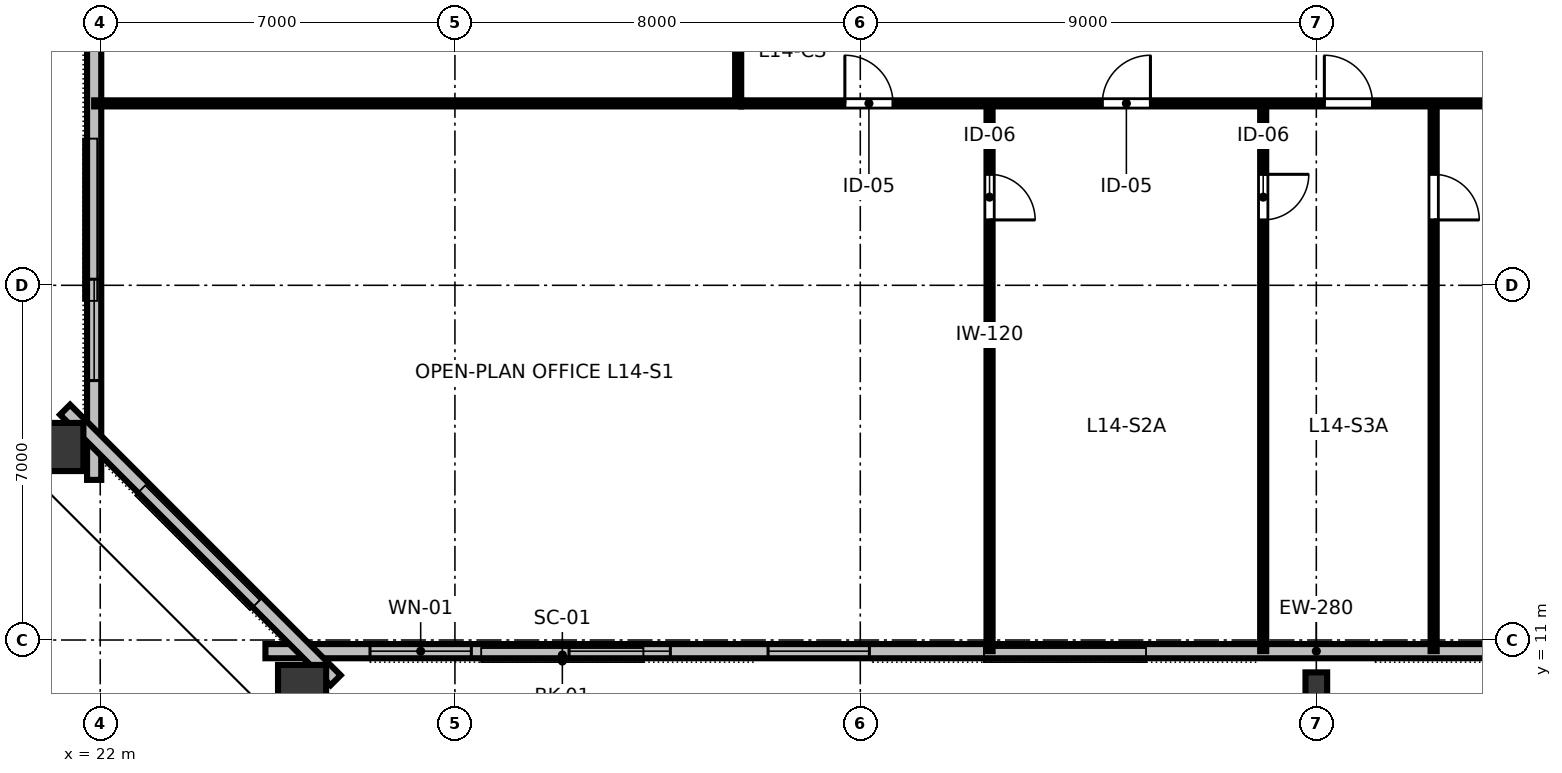
"""IFC4 building model, lengths in metres.
Left out: names, types, materials, properties, quantities, classifications, styles, units other than length and angle.
Written with IfcOpenShell. Run it as: python <this file> out.ifc"""

import sys

from ifc_helpers import new_model, si_unit, direction, frame, frame_2d, origin, origin_2d, place, context, subcontext, project, spatial, rectangle, hollow_rectangle, i_section, extrude, element, fill, save


model = new_model("IFC4")
c1 = context("Model", 3, precision=1e-05, world=origin(), true_north=direction((0.0, 1.0)))
c2 = subcontext(c1, "Body", "Model", "MODEL_VIEW")
j1 = project(units=[si_unit("LENGTHUNIT", "METRE"), si_unit("PLANEANGLEUNIT", "RADIAN")], contexts=[c1])
p1 = place(None, origin())
s1 = spatial("IfcSite", under=j1, at=p1, CompositionType="ELEMENT")
p2 = place(p1, origin())
s2 = spatial("IfcBuilding", under=s1, at=p2, CompositionType="ELEMENT")
p3 = place(p2, frame((0.0, 0.0, 56.8)))
s3 = spatial("IfcBuildingStorey", under=s2, at=p3, CompositionType="ELEMENT", Elevation=56.8)
p4 = place(p3, frame((25.984, 9.933, 0.0), z_axis=(-0.04485544424, -0.088480981137, 0.995067387215), x_axis=(0.891933822614, -0.452165960769, 0.0)))
e1 = element("IfcColumn", 1, at=p4, inside=s3, PredefinedType="COLUMN", context=c2, shape_type="SweptSolid", body=[
    extrude(hollow_rectangle(XDim=0.95, YDim=1.15, WallThickness=0.06, at=origin_2d()), origin(), (0.0, 0.0, 1.0), 3.375),
])
p5 = place(p3, frame((46.0, 10.12, 0.0), z_axis=(0.0, -0.089001216718, 0.996031517284), x_axis=(1.0, 0.0, 0.0)))
e2 = element("IfcColumn", 2, at=p5, inside=s3, PredefinedType="COLUMN", context=c2, shape_type="SweptSolid", body=[
    extrude(i_section(OverallWidth=0.428, OverallDepth=0.483, WebThickness=0.051, FlangeThickness=0.082, FilletRadius=0.025, at=origin_2d()), origin(), (0.0, 0.0, 1.0), 3.371),
])
p6 = place(p3, frame((21.093, 14.809, 0.0), z_axis=(-0.103150348316, -0.030287313206, 0.994204548522), x_axis=(0.953933183148, 0.280096708997, 0.107504956625)))
e3 = element("IfcColumn", 3, at=p6, inside=s3, PredefinedType="COLUMN", context=c2, shape_type="SweptSolid", body=[
    extrude(hollow_rectangle(XDim=0.95, YDim=1.15, WallThickness=0.06, at=origin_2d()), origin(), (0.0, 0.0, 1.0), 3.377),
])
p7 = place(p3, frame((25.26, 10.78, 0.0), z_axis=(0.0, 0.0, 1.0), x_axis=(1.0, 0.0, 0.0)))
e4 = element("IfcWall", 4, at=p7, inside=s3, PredefinedType="STANDARD", context=c2, shape_type="SweptSolid", body=[
    extrude(rectangle(XDim=41.48, YDim=0.28, at=frame_2d((20.74, 0.0))), origin(), (0.0, 0.0, 1.0), 3.36),
])
p8 = place(p7, frame((2.064, 0.0, 0.8)))
e5 = element("IfcOpeningElement", 5, at=p8, cuts=e4, PredefinedType="OPENING", context=c2, shape_type="SweptSolid", body=[
    extrude(rectangle(XDim=2.0, YDim=1.95, at=frame_2d((1.0, 0.975))), frame((0.0, 0.15, 0.0), z_axis=(0.0, -1.0, 0.0), x_axis=(1.0, 0.0, 0.0)), (0.0, 0.0, 1.0), 0.3),
])
p9 = place(p7, frame((5.992, 0.0, 0.8)))
e6 = element("IfcOpeningElement", 6, at=p9, cuts=e4, PredefinedType="OPENING", context=c2, shape_type="SweptSolid", body=[
    extrude(rectangle(XDim=2.0, YDim=1.95, at=frame_2d((1.0, 0.975))), frame((0.0, 0.15, 0.0), z_axis=(0.0, -1.0, 0.0), x_axis=(1.0, 0.0, 0.0)), (0.0, 0.0, 1.0), 0.3),
])
p10 = place(p7, frame((9.92, 0.0, 0.8)))
e7 = element("IfcOpeningElement", 7, at=p10, cuts=e4, PredefinedType="OPENING", context=c2, shape_type="SweptSolid", body=[
    extrude(rectangle(XDim=2.0, YDim=1.95, at=frame_2d((1.0, 0.975))), frame((0.0, 0.15, 0.0), z_axis=(0.0, -1.0, 0.0), x_axis=(1.0, 0.0, 0.0)), (0.0, 0.0, 1.0), 0.3),
])
p11 = place(p7, frame((25.632, 0.0, 0.8)))
e8 = element("IfcOpeningElement", 8, at=p11, cuts=e4, PredefinedType="OPENING", context=c2, shape_type="SweptSolid", body=[
    extrude(rectangle(XDim=2.0, YDim=1.95, at=frame_2d((1.0, 0.975))), frame((0.0, 0.15, 0.0), z_axis=(0.0, -1.0, 0.0), x_axis=(1.0, 0.0, 0.0)), (0.0, 0.0, 1.0), 0.3),
])
p12 = place(p7, frame((29.56, 0.0, 0.8)))
e9 = element("IfcOpeningElement", 9, at=p12, cuts=e4, PredefinedType="OPENING", context=c2, shape_type="SweptSolid", body=[
    extrude(rectangle(XDim=2.0, YDim=1.95, at=frame_2d((1.0, 0.975))), frame((0.0, 0.15, 0.0), z_axis=(0.0, -1.0, 0.0), x_axis=(1.0, 0.0, 0.0)), (0.0, 0.0, 1.0), 0.3),
])
p13 = place(p7, frame((33.488, 0.0, 0.8)))
e10 = element("IfcOpeningElement", 10, at=p13, cuts=e4, PredefinedType="OPENING", context=c2, shape_type="SweptSolid", body=[
    extrude(rectangle(XDim=2.0, YDim=1.95, at=frame_2d((1.0, 0.975))), frame((0.0, 0.15, 0.0), z_axis=(0.0, -1.0, 0.0), x_axis=(1.0, 0.0, 0.0)), (0.0, 0.0, 1.0), 0.3),
])
p14 = place(p7, frame((37.416, 0.0, 0.8)))
e11 = element("IfcOpeningElement", 11, at=p14, cuts=e4, PredefinedType="OPENING", context=c2, shape_type="SweptSolid", body=[
    extrude(rectangle(XDim=2.0, YDim=1.95, at=frame_2d((1.0, 0.975))), frame((0.0, 0.15, 0.0), z_axis=(0.0, -1.0, 0.0), x_axis=(1.0, 0.0, 0.0)), (0.0, 0.0, 1.0), 0.3),
])
p15 = place(p3, frame((21.88, 49.84, 0.0), z_axis=(0.0, 0.0, 1.0), x_axis=(0.0, -1.0, 0.0)))
e12 = element("IfcWall", 12, at=p15, inside=s3, PredefinedType="STANDARD", context=c2, shape_type="SweptSolid", body=[
    extrude(rectangle(XDim=35.68, YDim=0.28, at=frame_2d((17.84, 0.0))), origin(), (0.0, 0.0, 1.0), 3.36),
])
p16 = place(p15, frame((1.96, 0.0, 0.8)))
e13 = element("IfcOpeningElement", 13, at=p16, cuts=e12, PredefinedType="OPENING", context=c2, shape_type="SweptSolid", body=[
    extrude(rectangle(XDim=2.0, YDim=1.95, at=frame_2d((1.0, 0.975))), frame((0.0, 0.15, 0.0), z_axis=(0.0, -1.0, 0.0), x_axis=(1.0, 0.0, 0.0)), (0.0, 0.0, 1.0), 0.3),
])
p17 = place(p15, frame((9.4, 0.0, 0.8)))
e14 = element("IfcOpeningElement", 14, at=p17, cuts=e12, PredefinedType="OPENING", context=c2, shape_type="SweptSolid", body=[
    extrude(rectangle(XDim=2.0, YDim=1.95, at=frame_2d((1.0, 0.975))), frame((0.0, 0.15, 0.0), z_axis=(0.0, -1.0, 0.0), x_axis=(1.0, 0.0, 0.0)), (0.0, 0.0, 1.0), 0.3),
])
p18 = place(p15, frame((13.12, 0.0, 0.8)))
e15 = element("IfcOpeningElement", 15, at=p18, cuts=e12, PredefinedType="OPENING", context=c2, shape_type="SweptSolid", body=[
    extrude(rectangle(XDim=2.0, YDim=1.95, at=frame_2d((1.0, 0.975))), frame((0.0, 0.15, 0.0), z_axis=(0.0, -1.0, 0.0), x_axis=(1.0, 0.0, 0.0)), (0.0, 0.0, 1.0), 0.3),
])
p19 = place(p15, frame((20.56, 0.0, 0.8)))
e16 = element("IfcOpeningElement", 16, at=p19, cuts=e12, PredefinedType="OPENING", context=c2, shape_type="SweptSolid", body=[
    extrude(rectangle(XDim=2.0, YDim=1.95, at=frame_2d((1.0, 0.975))), frame((0.0, 0.15, 0.0), z_axis=(0.0, -1.0, 0.0), x_axis=(1.0, 0.0, 0.0)), (0.0, 0.0, 1.0), 0.3),
])
p20 = place(p15, frame((24.28, 0.0, 0.8)))
e17 = element("IfcOpeningElement", 17, at=p20, cuts=e12, PredefinedType="OPENING", context=c2, shape_type="SweptSolid", body=[
    extrude(rectangle(XDim=2.0, YDim=1.95, at=frame_2d((1.0, 0.975))), frame((0.0, 0.15, 0.0), z_axis=(0.0, -1.0, 0.0), x_axis=(1.0, 0.0, 0.0)), (0.0, 0.0, 1.0), 0.3),
])
p21 = place(p15, frame((31.72, 0.0, 0.8)))
e18 = element("IfcOpeningElement", 18, at=p21, cuts=e12, PredefinedType="OPENING", context=c2, shape_type="SweptSolid", body=[
    extrude(rectangle(XDim=2.0, YDim=1.95, at=frame_2d((1.0, 0.975))), frame((0.0, 0.15, 0.0), z_axis=(0.0, -1.0, 0.0), x_axis=(1.0, 0.0, 0.0)), (0.0, 0.0, 1.0), 0.3),
])
p22 = place(p3, frame((21.306, 15.545, 0.0), z_axis=(0.0, 0.0, 1.0), x_axis=(0.707106781187, -0.707106781187, 0.0)))
e19 = element("IfcWall", 19, at=p22, inside=s3, PredefinedType="STANDARD", context=c2, shape_type="SweptSolid", body=[
    extrude(rectangle(XDim=7.551, YDim=0.28, at=frame_2d((3.775, 0.0))), origin(), (0.0, 0.0, 1.0), 3.36),
])
p23 = place(p3, frame((39.551, 21.59, 0.0), z_axis=(0.0, 0.0, 1.0), x_axis=(0.0, -1.0, 0.0)))
e20 = element("IfcWall", 20, at=p23, inside=s3, PredefinedType="PARTITIONING", context=c2, shape_type="SweptSolid", body=[
    extrude(rectangle(XDim=10.81, YDim=0.12, at=frame_2d((5.405, 0.0))), origin(), (0.0, 0.0, 1.0), 2.64),
])
p24 = place(p23, frame((1.4, 0.0, 0.0)))
e21 = element("IfcOpeningElement", 21, at=p24, cuts=e20, PredefinedType="OPENING", context=c2, shape_type="SweptSolid", body=[
    extrude(rectangle(XDim=0.9, YDim=2.15, at=frame_2d((0.45, 1.075))), frame((0.0, 0.07, 0.0), z_axis=(0.0, -1.0, 0.0), x_axis=(1.0, 0.0, 0.0)), (0.0, 0.0, 1.0), 0.14),
])
p25 = place(p3, frame((44.952, 21.59, 0.0), z_axis=(0.0, 0.0, 1.0), x_axis=(0.0, -1.0, 0.0)))
e22 = element("IfcWall", 22, at=p25, inside=s3, PredefinedType="PARTITIONING", context=c2, shape_type="SweptSolid", body=[
    extrude(rectangle(XDim=10.81, YDim=0.12, at=frame_2d((5.405, 0.0))), origin(), (0.0, 0.0, 1.0), 2.64),
])
p26 = place(p25, frame((1.4, 0.0, 0.0)))
e23 = element("IfcOpeningElement", 23, at=p26, cuts=e22, PredefinedType="OPENING", context=c2, shape_type="SweptSolid", body=[
    extrude(rectangle(XDim=0.9, YDim=2.15, at=frame_2d((0.45, 1.075))), frame((0.0, 0.07, 0.0), z_axis=(0.0, -1.0, 0.0), x_axis=(1.0, 0.0, 0.0)), (0.0, 0.0, 1.0), 0.14),
])
p27 = place(p3, frame((48.316, 21.59, 0.0), z_axis=(0.0, 0.0, 1.0), x_axis=(0.0, -1.0, 0.0)))
e24 = element("IfcWall", 24, at=p27, inside=s3, PredefinedType="PARTITIONING", context=c2, shape_type="SweptSolid", body=[
    extrude(rectangle(XDim=10.81, YDim=0.12, at=frame_2d((5.405, 0.0))), origin(), (0.0, 0.0, 1.0), 2.64),
])
p28 = place(p27, frame((1.4, 0.0, 0.0)))
e25 = element("IfcOpeningElement", 25, at=p28, cuts=e24, PredefinedType="OPENING", context=c2, shape_type="SweptSolid", body=[
    extrude(rectangle(XDim=0.9, YDim=2.15, at=frame_2d((0.45, 1.075))), frame((0.0, 0.07, 0.0), z_axis=(0.0, -1.0, 0.0), x_axis=(1.0, 0.0, 0.0)), (0.0, 0.0, 1.0), 0.14),
])
p29 = place(p3, frame((34.65, 21.59, 0.0), z_axis=(0.0, 0.0, 1.0), x_axis=(1.0, 0.0, 0.0)))
e26 = element("IfcWall", 26, at=p29, inside=s3, PredefinedType="PARTITIONING", context=c2, shape_type="SweptSolid", body=[
    extrude(rectangle(XDim=22.7, YDim=0.12, at=frame_2d((11.35, 0.0))), origin(), (0.0, 0.0, 1.0), 2.64),
])
p30 = place(p29, frame((2.045, 0.0, 0.0)))
e27 = element("IfcOpeningElement", 27, at=p30, cuts=e26, PredefinedType="OPENING", context=c2, shape_type="SweptSolid", body=[
    extrude(rectangle(XDim=0.95, YDim=2.15, at=frame_2d((0.475, 1.075))), frame((0.0, 0.07, 0.0), z_axis=(0.0, -1.0, 0.0), x_axis=(1.0, 0.0, 0.0)), (0.0, 0.0, 1.0), 0.14),
])
p31 = place(p29, frame((7.126, 0.0, 0.0)))
e28 = element("IfcOpeningElement", 28, at=p31, cuts=e26, PredefinedType="OPENING", context=c2, shape_type="SweptSolid", body=[
    extrude(rectangle(XDim=0.95, YDim=2.15, at=frame_2d((0.475, 1.075))), frame((0.0, 0.07, 0.0), z_axis=(0.0, -1.0, 0.0), x_axis=(1.0, 0.0, 0.0)), (0.0, 0.0, 1.0), 0.14),
])
p32 = place(p29, frame((11.509, 0.0, 0.0)))
e29 = element("IfcOpeningElement", 29, at=p32, cuts=e26, PredefinedType="OPENING", context=c2, shape_type="SweptSolid", body=[
    extrude(rectangle(XDim=0.95, YDim=2.15, at=frame_2d((0.475, 1.075))), frame((0.0, 0.07, 0.0), z_axis=(0.0, -1.0, 0.0), x_axis=(1.0, 0.0, 0.0)), (0.0, 0.0, 1.0), 0.14),
])
p33 = place(p29, frame((17.638, 0.0, 0.0)))
e30 = element("IfcOpeningElement", 30, at=p33, cuts=e26, PredefinedType="OPENING", context=c2, shape_type="SweptSolid", body=[
    extrude(rectangle(XDim=0.95, YDim=2.15, at=frame_2d((0.475, 1.075))), frame((0.0, 0.07, 0.0), z_axis=(0.0, -1.0, 0.0), x_axis=(1.0, 0.0, 0.0)), (0.0, 0.0, 1.0), 0.14),
])
p34 = place(p3, frame((34.59, 21.65, 0.0), z_axis=(0.0, 0.0, 1.0), x_axis=(0.0, 1.0, 0.0)))
e31 = element("IfcWall", 31, at=p34, inside=s3, PredefinedType="PARTITIONING", context=c2, shape_type="SweptSolid", body=[
    extrude(rectangle(XDim=20.7, YDim=0.12, at=frame_2d((10.35, 0.0))), origin(), (0.0, 0.0, 1.0), 2.64),
])
p35 = place(p34, frame((9.875, 0.0, 0.0)))
e32 = element("IfcOpeningElement", 32, at=p35, cuts=e31, PredefinedType="OPENING", context=c2, shape_type="SweptSolid", body=[
    extrude(rectangle(XDim=0.95, YDim=2.15, at=frame_2d((0.475, 1.075))), frame((0.0, 0.07, 0.0), z_axis=(0.0, -1.0, 0.0), x_axis=(1.0, 0.0, 0.0)), (0.0, 0.0, 1.0), 0.14),
])
p36 = place(p3, frame((34.65, 21.59, 0.0), z_axis=(0.0, 0.0, 1.0), x_axis=(-1.0, 0.0, 0.0)))
e33 = element("IfcWall", 33, at=p36, inside=s3, PredefinedType="PARTITIONING", context=c2, shape_type="SweptSolid", body=[
    extrude(rectangle(XDim=12.77, YDim=0.12, at=frame_2d((6.385, 0.0))), origin(), (0.0, 0.0, 1.0), 2.64),
])
p37 = place(p8, origin())
e34 = element("IfcWindow", 34, at=p37, inside=s3, PartitioningType="SINGLE_PANEL", PredefinedType="WINDOW", context=c2, shape_type="SweptSolid", body=[
    extrude(rectangle(XDim=2.0, YDim=1.95, at=frame_2d((1.0, 0.975))), frame((0.0, 0.03, 0.0), z_axis=(0.0, -1.0, 0.0), x_axis=(1.0, 0.0, 0.0)), (0.0, 0.0, 1.0), 0.06),
])
fill(e5, e34)
p38 = place(p9, origin())
e35 = element("IfcWindow", 35, at=p38, inside=s3, PartitioningType="SINGLE_PANEL", PredefinedType="WINDOW", context=c2, shape_type="SweptSolid", body=[
    extrude(rectangle(XDim=2.0, YDim=1.95, at=frame_2d((1.0, 0.975))), frame((0.0, 0.03, 0.0), z_axis=(0.0, -1.0, 0.0), x_axis=(1.0, 0.0, 0.0)), (0.0, 0.0, 1.0), 0.06),
])
fill(e6, e35)
p39 = place(p10, origin())
e36 = element("IfcWindow", 36, at=p39, inside=s3, PartitioningType="SINGLE_PANEL", PredefinedType="WINDOW", context=c2, shape_type="SweptSolid", body=[
    extrude(rectangle(XDim=2.0, YDim=1.95, at=frame_2d((1.0, 0.975))), frame((0.0, 0.03, 0.0), z_axis=(0.0, -1.0, 0.0), x_axis=(1.0, 0.0, 0.0)), (0.0, 0.0, 1.0), 0.06),
])
fill(e7, e36)
p40 = place(p21, origin())
e37 = element("IfcWindow", 37, at=p40, inside=s3, PartitioningType="SINGLE_PANEL", PredefinedType="WINDOW", context=c2, shape_type="SweptSolid", body=[
    extrude(rectangle(XDim=2.0, YDim=1.95, at=frame_2d((1.0, 0.975))), frame((0.0, 0.03, 0.0), z_axis=(0.0, -1.0, 0.0), x_axis=(1.0, 0.0, 0.0)), (0.0, 0.0, 1.0), 0.06),
])
fill(e18, e37)
p41 = place(p24, origin())
e38 = element("IfcDoor", 38, at=p41, inside=s3, OperationType="SINGLE_SWING_RIGHT", PredefinedType="DOOR", context=c2, shape_type="SweptSolid", body=[
    extrude(rectangle(XDim=0.9, YDim=2.15, at=frame_2d((0.45, 1.075))), frame((0.0, 0.025, 0.0), z_axis=(0.0, -1.0, 0.0), x_axis=(1.0, 0.0, 0.0)), (0.0, 0.0, 1.0), 0.05),
])
fill(e21, e38)
p42 = place(p26, origin())
e39 = element("IfcDoor", 39, at=p42, inside=s3, OperationType="SINGLE_SWING_LEFT", PredefinedType="DOOR", context=c2, shape_type="SweptSolid", body=[
    extrude(rectangle(XDim=0.9, YDim=2.15, at=frame_2d((0.45, 1.075))), frame((0.0, 0.025, 0.0), z_axis=(0.0, -1.0, 0.0), x_axis=(1.0, 0.0, 0.0)), (0.0, 0.0, 1.0), 0.05),
])
fill(e23, e39)
p43 = place(p28, origin())
e40 = element("IfcDoor", 40, at=p43, inside=s3, OperationType="SINGLE_SWING_RIGHT", PredefinedType="DOOR", context=c2, shape_type="SweptSolid", body=[
    extrude(rectangle(XDim=0.9, YDim=2.15, at=frame_2d((0.45, 1.075))), frame((0.0, 0.025, 0.0), z_axis=(0.0, -1.0, 0.0), x_axis=(1.0, 0.0, 0.0)), (0.0, 0.0, 1.0), 0.05),
])
fill(e25, e40)
p44 = place(p30, origin())
e41 = element("IfcDoor", 41, at=p44, inside=s3, OperationType="SINGLE_SWING_LEFT", PredefinedType="DOOR", context=c2, shape_type="SweptSolid", body=[
    extrude(rectangle(XDim=0.95, YDim=2.15, at=frame_2d((0.475, 1.075))), frame((0.0, 0.025, 0.0), z_axis=(0.0, -1.0, 0.0), x_axis=(1.0, 0.0, 0.0)), (0.0, 0.0, 1.0), 0.05),
])
fill(e27, e41)
p45 = place(p31, origin())
e42 = element("IfcDoor", 42, at=p45, inside=s3, OperationType="SINGLE_SWING_RIGHT", PredefinedType="DOOR", context=c2, shape_type="SweptSolid", body=[
    extrude(rectangle(XDim=0.95, YDim=2.15, at=frame_2d((0.475, 1.075))), frame((0.0, 0.025, 0.0), z_axis=(0.0, -1.0, 0.0), x_axis=(1.0, 0.0, 0.0)), (0.0, 0.0, 1.0), 0.05),
])
fill(e28, e42)
p46 = place(p32, origin())
e43 = element("IfcDoor", 43, at=p46, inside=s3, OperationType="SINGLE_SWING_LEFT", PredefinedType="DOOR", context=c2, shape_type="SweptSolid", body=[
    extrude(rectangle(XDim=0.95, YDim=2.15, at=frame_2d((0.475, 1.075))), frame((0.0, 0.025, 0.0), z_axis=(0.0, -1.0, 0.0), x_axis=(1.0, 0.0, 0.0)), (0.0, 0.0, 1.0), 0.05),
])
fill(e29, e43)
save(model, sys.argv[1])
